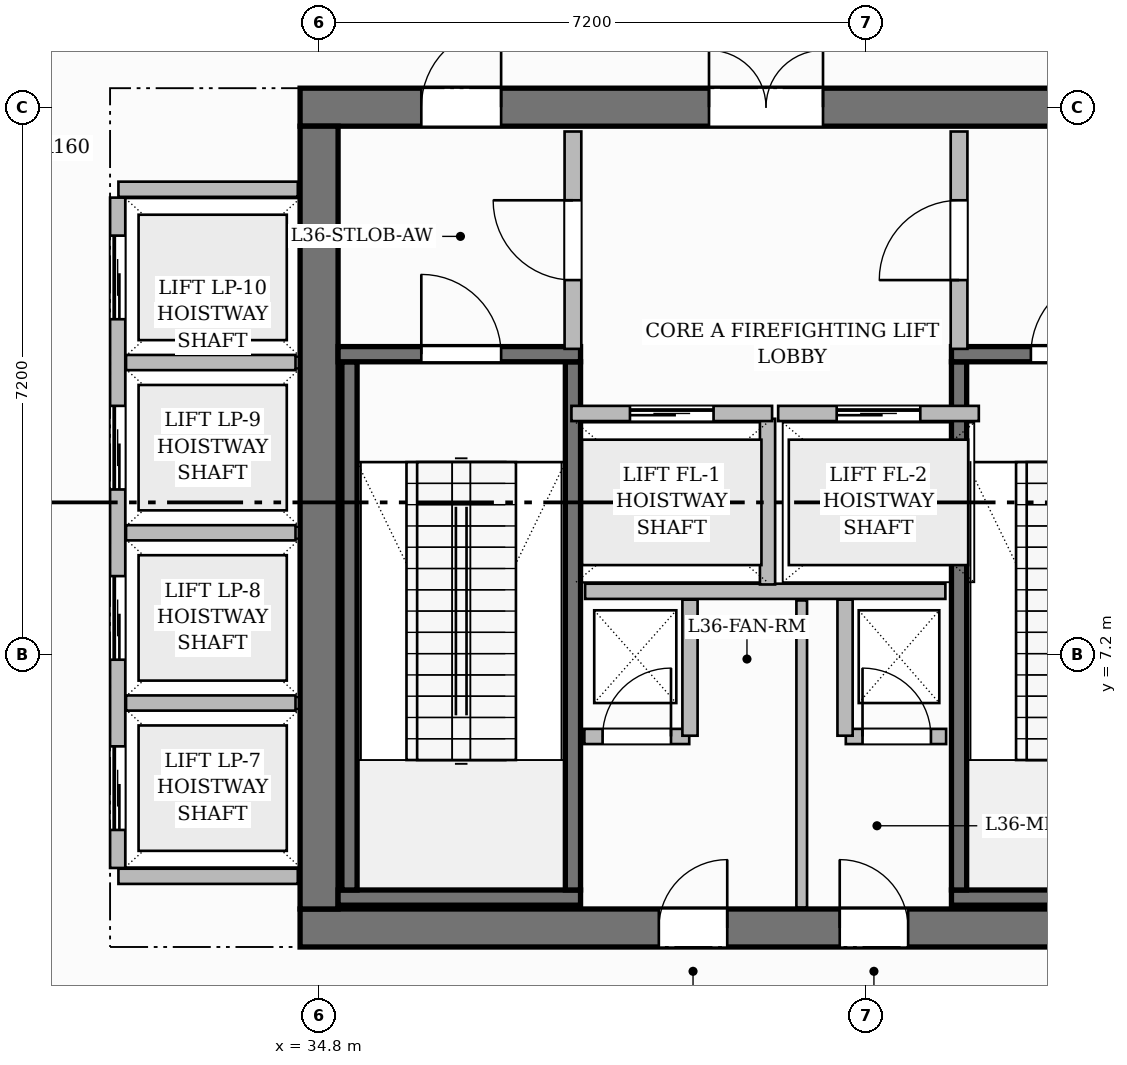
"""IFC4 building model, lengths in metres.
Left out: names, types, materials, properties, quantities, classifications, styles, units other than length and angle.
Written with IfcOpenShell. Run it as: python <this file> out.ifc"""

import sys

from ifc_helpers import new_model, si_unit, direction, frame, frame_2d, origin, place, context, subcontext, project, spatial, rectangle, extrude, source, transform, mapped, element, fill, save


model = new_model("IFC4")
c1 = context("Model", 3, precision=1e-05, world=origin(), true_north=direction((0.0, 1.0)))
c2 = subcontext(c1, "Body", "Model", "MODEL_VIEW")
j1 = project(units=[si_unit("LENGTHUNIT", "METRE"), si_unit("PLANEANGLEUNIT", "RADIAN")], contexts=[c1])
p1 = place(None, origin())
s1 = spatial("IfcSite", under=j1, at=p1, CompositionType="ELEMENT")
p2 = place(p1, origin())
s2 = spatial("IfcBuilding", under=s1, at=p2, CompositionType="ELEMENT")
p3 = place(p2, frame((0.0, 0.0, 145.1)))
s3 = spatial("IfcBuildingStorey", under=s2, at=p3, CompositionType="ELEMENT", Elevation=145.1)
p4 = place(p3, frame((34.55, 3.6, 0.0), z_axis=(0.0, 0.0, 1.0), x_axis=(1.0, 0.0, 0.0)))
e1 = element("IfcWall", 1, at=p4, inside=s3, PredefinedType="SHEAR", context=c2, shape_type="SweptSolid", body=[
    extrude(rectangle(XDim=15.5, YDim=0.5, at=frame_2d((7.75, 0.0))), origin(), (0.0, 0.0, 1.0), 5.2),
])
p5 = place(p4, frame((4.72, 0.0, 0.0)))
e2 = element("IfcOpeningElement", 2, at=p5, cuts=e1, PredefinedType="OPENING", context=c2, shape_type="SweptSolid", body=[
    extrude(rectangle(XDim=0.9, YDim=2.1, at=frame_2d((0.45, 1.05))), frame((0.0, 0.26, 0.0), z_axis=(0.0, -1.0, 0.0), x_axis=(1.0, 0.0, 0.0)), (0.0, 0.0, 1.0), 0.52),
])
p6 = place(p4, frame((7.1, 0.0, 0.0)))
e3 = element("IfcOpeningElement", 3, at=p6, cuts=e1, PredefinedType="OPENING", context=c2, shape_type="SweptSolid", body=[
    extrude(rectangle(XDim=0.9, YDim=2.1, at=frame_2d((0.45, 1.05))), frame((0.0, 0.26, 0.0), z_axis=(0.0, -1.0, 0.0), x_axis=(1.0, 0.0, 0.0)), (0.0, 0.0, 1.0), 0.52),
])
p7 = place(p3, frame((34.55, 14.4, 0.0), z_axis=(0.0, 0.0, 1.0), x_axis=(1.0, 0.0, 0.0)))
e4 = element("IfcWall", 4, at=p7, inside=s3, PredefinedType="SHEAR", context=c2, shape_type="SweptSolid", body=[
    extrude(rectangle(XDim=15.5, YDim=0.5, at=frame_2d((7.75, 0.0))), origin(), (0.0, 0.0, 1.0), 5.2),
])
p8 = place(p7, frame((5.38, 0.0, 0.0)))
e5 = element("IfcOpeningElement", 5, at=p8, cuts=e4, PredefinedType="OPENING", context=c2, shape_type="SweptSolid", body=[
    extrude(rectangle(XDim=1.5, YDim=2.2, at=frame_2d((0.75, 1.1))), frame((0.0, 0.26, 0.0), z_axis=(0.0, -1.0, 0.0), x_axis=(1.0, 0.0, 0.0)), (0.0, 0.0, 1.0), 0.52),
])
p9 = place(p7, frame((1.595, 0.0, 0.0)))
e6 = element("IfcOpeningElement", 6, at=p9, cuts=e4, PredefinedType="OPENING", context=c2, shape_type="SweptSolid", body=[
    extrude(rectangle(XDim=1.05, YDim=2.15, at=frame_2d((0.525, 1.075))), frame((0.0, 0.26, 0.0), z_axis=(0.0, -1.0, 0.0), x_axis=(1.0, 0.0, 0.0)), (0.0, 0.0, 1.0), 0.52),
])
p10 = place(p7, frame((11.225, 0.0, 0.0)))
e7 = element("IfcOpeningElement", 7, at=p10, cuts=e4, PredefinedType="OPENING", context=c2, shape_type="SweptSolid", body=[
    extrude(rectangle(XDim=1.05, YDim=2.15, at=frame_2d((0.525, 1.075))), frame((0.0, 0.26, 0.0), z_axis=(0.0, -1.0, 0.0), x_axis=(1.0, 0.0, 0.0)), (0.0, 0.0, 1.0), 0.52),
])
p11 = place(p3, frame((34.8, 3.85, 0.0), z_axis=(0.0, 0.0, 1.0), x_axis=(0.0, 1.0, 0.0)))
e8 = element("IfcWall", 8, at=p11, inside=s3, PredefinedType="SHEAR", context=c2, shape_type="SweptSolid", body=[
    extrude(rectangle(XDim=10.3, YDim=0.5, at=frame_2d((5.15, 0.0))), origin(), (0.0, 0.0, 1.0), 5.2),
])
p12 = place(p3, frame((35.05, 4.0, 0.0), z_axis=(0.0, 0.0, 1.0), x_axis=(1.0, 0.0, 0.0)))
e9 = element("IfcWall", 9, at=p12, inside=s3, PredefinedType="SHEAR", context=c2, shape_type="SweptSolid", body=[
    extrude(rectangle(XDim=3.19, YDim=0.2, at=frame_2d((1.595, 0.0))), origin(), (0.0, 0.0, 1.0), 5.2),
])
for number, where, z_axis, x_axis in (
    (10, (35.2, 4.1, 0.0), (0.0, 0.0, 1.0), (0.0, 1.0, 0.0)),
    (11, (38.14, 4.1, 0.0), (0.0, 0.0, 1.0), (0.0, 1.0, 0.0)),
):
    element("IfcWall", number, at=place(p3, frame(where, z_axis=z_axis, x_axis=x_axis)), inside=s3, PredefinedType="SHEAR", context=c2, shape_type="SweptSolid", body=[
        extrude(rectangle(XDim=6.95, YDim=0.2, at=frame_2d((3.475, 0.0))), origin(), (0.0, 0.0, 1.0), 5.2),
    ])
p13 = place(p3, frame((35.05, 11.15, 0.0), z_axis=(0.0, 0.0, 1.0), x_axis=(1.0, 0.0, 0.0)))
e12 = element("IfcWall", 12, at=p13, inside=s3, PredefinedType="SHEAR", context=c2, shape_type="SweptSolid", body=[
    extrude(rectangle(XDim=3.19, YDim=0.2, at=frame_2d((1.595, 0.0))), origin(), (0.0, 0.0, 1.0), 5.2),
])
p14 = place(p13, frame((1.095, 0.0, 0.0)))
e13 = element("IfcOpeningElement", 13, at=p14, cuts=e12, PredefinedType="OPENING", context=c2, shape_type="SweptSolid", body=[
    extrude(rectangle(XDim=1.05, YDim=2.2, at=frame_2d((0.525, 1.1))), frame((0.0, 0.11, 0.0), z_axis=(0.0, -1.0, 0.0), x_axis=(1.0, 0.0, 0.0)), (0.0, 0.0, 1.0), 0.22),
])
p15 = place(p3, frame((43.12, 4.0, 0.0), z_axis=(0.0, 0.0, 1.0), x_axis=(1.0, 0.0, 0.0)))
e14 = element("IfcWall", 14, at=p15, inside=s3, PredefinedType="SHEAR", context=c2, shape_type="SweptSolid", body=[
    extrude(rectangle(XDim=6.43, YDim=0.2, at=frame_2d((3.215, 0.0))), origin(), (0.0, 0.0, 1.0), 5.2),
])
p16 = place(p3, frame((43.22, 4.1, 0.0), z_axis=(0.0, 0.0, 1.0), x_axis=(0.0, 1.0, 0.0)))
e15 = element("IfcWall", 15, at=p16, inside=s3, PredefinedType="SHEAR", context=c2, shape_type="SweptSolid", body=[
    extrude(rectangle(XDim=6.95, YDim=0.2, at=frame_2d((3.475, 0.0))), origin(), (0.0, 0.0, 1.0), 5.2),
])
p17 = place(p3, frame((43.12, 11.15, 0.0), z_axis=(0.0, 0.0, 1.0), x_axis=(1.0, 0.0, 0.0)))
e16 = element("IfcWall", 16, at=p17, inside=s3, PredefinedType="SHEAR", context=c2, shape_type="SweptSolid", body=[
    extrude(rectangle(XDim=6.43, YDim=0.2, at=frame_2d((3.215, 0.0))), origin(), (0.0, 0.0, 1.0), 5.2),
])
p18 = place(p17, frame((1.045, 0.0, 0.0)))
e17 = element("IfcOpeningElement", 17, at=p18, cuts=e16, PredefinedType="OPENING", context=c2, shape_type="SweptSolid", body=[
    extrude(rectangle(XDim=1.05, YDim=2.2, at=frame_2d((0.525, 1.1))), frame((0.0, 0.11, 0.0), z_axis=(0.0, -1.0, 0.0), x_axis=(1.0, 0.0, 0.0)), (0.0, 0.0, 1.0), 0.22),
])
p19 = place(p17, frame((4.125, 0.0, 0.0)))
e18 = element("IfcOpeningElement", 18, at=p19, cuts=e16, PredefinedType="OPENING", context=c2, shape_type="SweptSolid", body=[
    extrude(rectangle(XDim=1.05, YDim=2.2, at=frame_2d((0.525, 1.1))), frame((0.0, 0.11, 0.0), z_axis=(0.0, -1.0, 0.0), x_axis=(1.0, 0.0, 0.0)), (0.0, 0.0, 1.0), 0.22),
])
p20 = place(p3, frame((38.3, 8.03, 0.0), z_axis=(0.0, 0.0, 1.0), x_axis=(1.0, 0.0, 0.0)))
e19 = element("IfcWall", 19, at=p20, inside=s3, PredefinedType="PARTITIONING", context=c2, shape_type="SweptSolid", body=[
    extrude(rectangle(XDim=4.74, YDim=0.2, at=frame_2d((2.37, 0.0))), origin(), (0.0, 0.0, 1.0), 4.95),
])
p21 = place(p3, frame((40.7, 8.12, 0.0), z_axis=(0.0, 0.0, 1.0), x_axis=(0.0, 1.0, 0.0)))
e20 = element("IfcWall", 20, at=p21, inside=s3, PredefinedType="PARTITIONING", context=c2, shape_type="SweptSolid", body=[
    extrude(rectangle(XDim=2.18, YDim=0.2, at=frame_2d((1.09, 0.0))), origin(), (0.0, 0.0, 1.0), 4.95),
])
p22 = place(p3, frame((38.14, 11.22, 0.0), z_axis=(0.0, 0.0, 1.0), x_axis=(0.0, 1.0, 0.0)))
e21 = element("IfcWall", 21, at=p22, inside=s3, PredefinedType="PARTITIONING", context=c2, shape_type="SweptSolid", body=[
    extrude(rectangle(XDim=2.86, YDim=0.22, at=frame_2d((1.43, 0.0))), origin(), (0.0, 0.0, 1.0), 4.95),
])
p23 = place(p22, frame((0.905, 0.0, 0.0)))
e22 = element("IfcOpeningElement", 22, at=p23, cuts=e21, PredefinedType="OPENING", context=c2, shape_type="SweptSolid", body=[
    extrude(rectangle(XDim=1.05, YDim=2.15, at=frame_2d((0.525, 1.075))), frame((0.0, 0.12, 0.0), z_axis=(0.0, -1.0, 0.0), x_axis=(1.0, 0.0, 0.0)), (0.0, 0.0, 1.0), 0.24),
])
p24 = place(p3, frame((43.22, 11.22, 0.0), z_axis=(0.0, 0.0, 1.0), x_axis=(0.0, 1.0, 0.0)))
e23 = element("IfcWall", 23, at=p24, inside=s3, PredefinedType="PARTITIONING", context=c2, shape_type="SweptSolid", body=[
    extrude(rectangle(XDim=2.86, YDim=0.22, at=frame_2d((1.43, 0.0))), origin(), (0.0, 0.0, 1.0), 4.95),
])
p25 = place(p24, frame((0.905, 0.0, 0.0)))
e24 = element("IfcOpeningElement", 24, at=p25, cuts=e23, PredefinedType="OPENING", context=c2, shape_type="SweptSolid", body=[
    extrude(rectangle(XDim=1.05, YDim=2.15, at=frame_2d((0.525, 1.075))), frame((0.0, 0.12, 0.0), z_axis=(0.0, -1.0, 0.0), x_axis=(1.0, 0.0, 0.0)), (0.0, 0.0, 1.0), 0.24),
])
p26 = place(p3, frame((38.29, 6.12, 0.0), z_axis=(0.0, 0.0, 1.0), x_axis=(1.0, 0.0, 0.0)))
e25 = element("IfcWall", 25, at=p26, inside=s3, PredefinedType="PARTITIONING", context=c2, shape_type="SweptSolid", body=[
    extrude(rectangle(XDim=1.38, YDim=0.2, at=frame_2d((0.69, 0.0))), origin(), (0.0, 0.0, 1.0), 4.95),
])
p27 = place(p26, frame((0.24, 0.0, 0.0)))
e26 = element("IfcOpeningElement", 26, at=p27, cuts=e25, PredefinedType="OPENING", context=c2, shape_type="SweptSolid", body=[
    extrude(rectangle(XDim=0.9, YDim=2.1, at=frame_2d((0.45, 1.05))), frame((0.0, 0.11, 0.0), z_axis=(0.0, -1.0, 0.0), x_axis=(1.0, 0.0, 0.0)), (0.0, 0.0, 1.0), 0.22),
])
p28 = place(p3, frame((39.68, 6.13, 0.0), z_axis=(0.0, 0.0, 1.0), x_axis=(0.0, 1.0, 0.0)))
e27 = element("IfcWall", 27, at=p28, inside=s3, PredefinedType="PARTITIONING", context=c2, shape_type="SweptSolid", body=[
    extrude(rectangle(XDim=1.79, YDim=0.2, at=frame_2d((0.895, 0.0))), origin(), (0.0, 0.0, 1.0), 4.95),
])
p29 = place(p3, frame((41.73, 6.12, 0.0), z_axis=(0.0, 0.0, 1.0), x_axis=(1.0, 0.0, 0.0)))
e28 = element("IfcWall", 28, at=p29, inside=s3, PredefinedType="PARTITIONING", context=c2, shape_type="SweptSolid", body=[
    extrude(rectangle(XDim=1.32, YDim=0.2, at=frame_2d((0.66, 0.0))), origin(), (0.0, 0.0, 1.0), 4.95),
])
p30 = place(p29, frame((0.22, 0.0, 0.0)))
e29 = element("IfcOpeningElement", 29, at=p30, cuts=e28, PredefinedType="OPENING", context=c2, shape_type="SweptSolid", body=[
    extrude(rectangle(XDim=0.9, YDim=2.1, at=frame_2d((0.45, 1.05))), frame((0.0, 0.11, 0.0), z_axis=(0.0, -1.0, 0.0), x_axis=(1.0, 0.0, 0.0)), (0.0, 0.0, 1.0), 0.22),
])
p31 = place(p3, frame((41.72, 6.13, 0.0), z_axis=(0.0, 0.0, 1.0), x_axis=(0.0, 1.0, 0.0)))
e30 = element("IfcWall", 30, at=p31, inside=s3, PredefinedType="PARTITIONING", context=c2, shape_type="SweptSolid", body=[
    extrude(rectangle(XDim=1.79, YDim=0.2, at=frame_2d((0.895, 0.0))), origin(), (0.0, 0.0, 1.0), 4.95),
])
p32 = place(p3, frame((41.15, 3.87, 0.0), z_axis=(0.0, 0.0, 1.0), x_axis=(0.0, 1.0, 0.0)))
e31 = element("IfcWall", 31, at=p32, inside=s3, PredefinedType="PARTITIONING", context=c2, shape_type="SweptSolid", body=[
    extrude(rectangle(XDim=4.04, YDim=0.14, at=frame_2d((2.02, 0.0))), origin(), (0.0, 0.0, 1.0), 4.95),
])
for number, where, z_axis, x_axis in (
    (32, (32.16, 4.28, 0.0), (0.0, 0.0, 1.0), (1.0, 0.0, 0.0)),
    (33, (32.16, 13.32, 0.0), (0.0, 0.0, 1.0), (1.0, 0.0, 0.0)),
):
    element("IfcWall", number, at=place(p3, frame(where, z_axis=z_axis, x_axis=x_axis)), inside=s3, PredefinedType="PARTITIONING", context=c2, shape_type="SweptSolid", body=[
        extrude(rectangle(XDim=2.36, YDim=0.2, at=frame_2d((1.18, 0.0))), origin(), (0.0, 0.0, 1.0), 4.95),
    ])
p33 = place(p3, frame((32.15, 4.39, 0.0), z_axis=(0.0, 0.0, 1.0), x_axis=(0.0, 1.0, 0.0)))
e34 = element("IfcWall", 34, at=p33, inside=s3, PredefinedType="PARTITIONING", context=c2, shape_type="SweptSolid", body=[
    extrude(rectangle(XDim=8.82, YDim=0.2, at=frame_2d((4.41, 0.0))), origin(), (0.0, 0.0, 1.0), 4.95),
])
p34 = place(p33, frame((0.5, 0.0, 0.0)))
e35 = element("IfcOpeningElement", 35, at=p34, cuts=e34, PredefinedType="OPENING", context=c2, shape_type="SweptSolid", body=[
    extrude(rectangle(XDim=1.1, YDim=2.2, at=frame_2d((0.55, 1.1))), frame((0.0, 0.11, 0.0), z_axis=(0.0, -1.0, 0.0), x_axis=(1.0, 0.0, 0.0)), (0.0, 0.0, 1.0), 0.22),
])
p35 = place(p33, frame((2.74, 0.0, 0.0)))
e36 = element("IfcOpeningElement", 36, at=p35, cuts=e34, PredefinedType="OPENING", context=c2, shape_type="SweptSolid", body=[
    extrude(rectangle(XDim=1.1, YDim=2.2, at=frame_2d((0.55, 1.1))), frame((0.0, 0.11, 0.0), z_axis=(0.0, -1.0, 0.0), x_axis=(1.0, 0.0, 0.0)), (0.0, 0.0, 1.0), 0.22),
])
p36 = place(p33, frame((4.98, 0.0, 0.0)))
e37 = element("IfcOpeningElement", 37, at=p36, cuts=e34, PredefinedType="OPENING", context=c2, shape_type="SweptSolid", body=[
    extrude(rectangle(XDim=1.1, YDim=2.2, at=frame_2d((0.55, 1.1))), frame((0.0, 0.11, 0.0), z_axis=(0.0, -1.0, 0.0), x_axis=(1.0, 0.0, 0.0)), (0.0, 0.0, 1.0), 0.22),
])
p37 = place(p33, frame((7.22, 0.0, 0.0)))
e38 = element("IfcOpeningElement", 38, at=p37, cuts=e34, PredefinedType="OPENING", context=c2, shape_type="SweptSolid", body=[
    extrude(rectangle(XDim=1.1, YDim=2.2, at=frame_2d((0.55, 1.1))), frame((0.0, 0.11, 0.0), z_axis=(0.0, -1.0, 0.0), x_axis=(1.0, 0.0, 0.0)), (0.0, 0.0, 1.0), 0.22),
])
for number, where, z_axis, x_axis in (
    (39, (32.26, 6.56, 0.0), (0.0, 0.0, 1.0), (1.0, 0.0, 0.0)),
    (40, (32.26, 8.8, 0.0), (0.0, 0.0, 1.0), (1.0, 0.0, 0.0)),
    (41, (32.26, 11.04, 0.0), (0.0, 0.0, 1.0), (1.0, 0.0, 0.0)),
):
    element("IfcWall", number, at=place(p3, frame(where, z_axis=z_axis, x_axis=x_axis)), inside=s3, PredefinedType="PARTITIONING", context=c2, shape_type="SweptSolid", body=[
        extrude(rectangle(XDim=2.23, YDim=0.2, at=frame_2d((1.115, 0.0))), origin(), (0.0, 0.0, 1.0), 4.95),
    ])
p38 = place(p3, frame((38.12, 10.37, 0.0), z_axis=(0.0, 0.0, 1.0), x_axis=(1.0, 0.0, 0.0)))
e42 = element("IfcWall", 42, at=p38, inside=s3, PredefinedType="PARTITIONING", context=c2, shape_type="SweptSolid", body=[
    extrude(rectangle(XDim=2.64, YDim=0.2, at=frame_2d((1.32, 0.0))), origin(), (0.0, 0.0, 1.0), 4.95),
])
p39 = place(p38, frame((0.77, 0.0, 0.0)))
e43 = element("IfcOpeningElement", 43, at=p39, cuts=e42, PredefinedType="OPENING", context=c2, shape_type="SweptSolid", body=[
    extrude(rectangle(XDim=1.1, YDim=2.2, at=frame_2d((0.55, 1.1))), frame((0.0, 0.11, 0.0), z_axis=(0.0, -1.0, 0.0), x_axis=(1.0, 0.0, 0.0)), (0.0, 0.0, 1.0), 0.22),
])
p40 = place(p3, frame((40.84, 10.37, 0.0), z_axis=(0.0, 0.0, 1.0), x_axis=(1.0, 0.0, 0.0)))
e44 = element("IfcWall", 44, at=p40, inside=s3, PredefinedType="PARTITIONING", context=c2, shape_type="SweptSolid", body=[
    extrude(rectangle(XDim=2.64, YDim=0.2, at=frame_2d((1.32, 0.0))), origin(), (0.0, 0.0, 1.0), 4.95),
])
p41 = place(p40, frame((0.77, 0.0, 0.0)))
e45 = element("IfcOpeningElement", 45, at=p41, cuts=e44, PredefinedType="OPENING", context=c2, shape_type="SweptSolid", body=[
    extrude(rectangle(XDim=1.1, YDim=2.2, at=frame_2d((0.55, 1.1))), frame((0.0, 0.11, 0.0), z_axis=(0.0, -1.0, 0.0), x_axis=(1.0, 0.0, 0.0)), (0.0, 0.0, 1.0), 0.22),
])
m1 = source(origin(), c2, "Body", "SweptSolid", [
    extrude(rectangle(XDim=1.05, YDim=2.2, at=frame_2d((0.525, 1.1))), frame((0.0, 0.025, 0.0), z_axis=(0.0, -1.0, 0.0), x_axis=(1.0, 0.0, 0.0)), (0.0, 0.0, 1.0), 0.05),
])
p42 = place(p14, origin())
e46 = element("IfcDoor", 46, at=p42, inside=s3, OperationType="SINGLE_SWING_LEFT", PredefinedType="DOOR", context=c2, shape_type="MappedRepresentation", body=[
    mapped(m1, transform((0.0, 0.0, 0.0), scale=1.0)),
])
fill(e13, e46)
p43 = place(p18, origin())
e47 = element("IfcDoor", 47, at=p43, inside=s3, OperationType="SINGLE_SWING_RIGHT", PredefinedType="DOOR", context=c2, shape_type="MappedRepresentation", body=[
    mapped(m1, transform((0.0, 0.0, 0.0), scale=1.0)),
])
fill(e17, e47)
m2 = source(origin(), c2, "Body", "SweptSolid", [
    extrude(rectangle(XDim=1.05, YDim=2.15, at=frame_2d((0.525, 1.075))), frame((0.0, 0.025, 0.0), z_axis=(0.0, -1.0, 0.0), x_axis=(1.0, 0.0, 0.0)), (0.0, 0.0, 1.0), 0.05),
])
p44 = place(p23, origin())
e48 = element("IfcDoor", 48, at=p44, inside=s3, OperationType="SINGLE_SWING_RIGHT", PredefinedType="DOOR", context=c2, shape_type="MappedRepresentation", body=[
    mapped(m2, transform((0.0, 0.0, 0.0), scale=1.0)),
])
fill(e22, e48)
p45 = place(p25, origin())
e49 = element("IfcDoor", 49, at=p45, inside=s3, OperationType="SINGLE_SWING_LEFT", PredefinedType="DOOR", context=c2, shape_type="MappedRepresentation", body=[
    mapped(m2, transform((0.0, 0.0, 0.0), scale=1.0)),
])
fill(e24, e49)
m3 = source(origin(), c2, "Body", "SweptSolid", [
    extrude(rectangle(XDim=1.5, YDim=2.2, at=frame_2d((0.75, 1.1))), frame((0.0, 0.025, 0.0), z_axis=(0.0, -1.0, 0.0), x_axis=(1.0, 0.0, 0.0)), (0.0, 0.0, 1.0), 0.05),
])
p46 = place(p8, origin())
e50 = element("IfcDoor", 50, at=p46, inside=s3, OperationType="DOUBLE_DOOR_SINGLE_SWING", PredefinedType="DOOR", context=c2, shape_type="MappedRepresentation", body=[
    mapped(m3, transform((0.0, 0.0, 0.0), scale=1.0)),
])
fill(e5, e50)
p47 = place(p9, origin())
e51 = element("IfcDoor", 51, at=p47, inside=s3, OperationType="SINGLE_SWING_RIGHT", PredefinedType="DOOR", context=c2, shape_type="MappedRepresentation", body=[
    mapped(m2, transform((0.0, 0.0, 0.0), scale=1.0)),
])
fill(e6, e51)
m4 = source(origin(), c2, "Body", "SweptSolid", [
    extrude(rectangle(XDim=0.9, YDim=2.1, at=frame_2d((0.45, 1.05))), frame((0.0, 0.025, 0.0), z_axis=(0.0, -1.0, 0.0), x_axis=(1.0, 0.0, 0.0)), (0.0, 0.0, 1.0), 0.05),
])
p48 = place(p27, origin())
e52 = element("IfcDoor", 52, at=p48, inside=s3, OperationType="SINGLE_SWING_RIGHT", PredefinedType="DOOR", context=c2, shape_type="MappedRepresentation", body=[
    mapped(m4, transform((0.0, 0.0, 0.0), scale=1.0)),
])
fill(e26, e52)
p49 = place(p30, origin())
e53 = element("IfcDoor", 53, at=p49, inside=s3, OperationType="SINGLE_SWING_LEFT", PredefinedType="DOOR", context=c2, shape_type="MappedRepresentation", body=[
    mapped(m4, transform((0.0, 0.0, 0.0), scale=1.0)),
])
fill(e29, e53)
p50 = place(p5, origin())
e54 = element("IfcDoor", 54, at=p50, inside=s3, OperationType="SINGLE_SWING_RIGHT", PredefinedType="DOOR", context=c2, shape_type="MappedRepresentation", body=[
    mapped(m4, transform((0.0, 0.0, 0.0), scale=1.0)),
])
fill(e2, e54)
p51 = place(p6, origin())
e55 = element("IfcDoor", 55, at=p51, inside=s3, OperationType="SINGLE_SWING_LEFT", PredefinedType="DOOR", context=c2, shape_type="MappedRepresentation", body=[
    mapped(m4, transform((0.0, 0.0, 0.0), scale=1.0)),
])
fill(e3, e55)
m5 = source(origin(), c2, "Body", "SweptSolid", [
    extrude(rectangle(XDim=1.1, YDim=2.2, at=frame_2d((0.55, 1.1))), frame((0.0, 0.025, 0.0), z_axis=(0.0, -1.0, 0.0), x_axis=(1.0, 0.0, 0.0)), (0.0, 0.0, 1.0), 0.05),
])
p52 = place(p39, origin())
e56 = element("IfcDoor", 56, at=p52, inside=s3, OperationType="SLIDING_TO_LEFT", PredefinedType="DOOR", context=c2, shape_type="MappedRepresentation", body=[
    mapped(m5, transform((0.0, 0.0, 0.0), scale=1.0)),
])
fill(e43, e56)
p53 = place(p41, origin())
e57 = element("IfcDoor", 57, at=p53, inside=s3, OperationType="SLIDING_TO_LEFT", PredefinedType="DOOR", context=c2, shape_type="MappedRepresentation", body=[
    mapped(m5, transform((0.0, 0.0, 0.0), scale=1.0)),
])
fill(e45, e57)
p54 = place(p34, origin())
e58 = element("IfcDoor", 58, at=p54, inside=s3, OperationType="SLIDING_TO_LEFT", PredefinedType="DOOR", context=c2, shape_type="MappedRepresentation", body=[
    mapped(m5, transform((0.0, 0.0, 0.0), scale=1.0)),
])
fill(e35, e58)
p55 = place(p35, origin())
e59 = element("IfcDoor", 59, at=p55, inside=s3, OperationType="SLIDING_TO_LEFT", PredefinedType="DOOR", context=c2, shape_type="MappedRepresentation", body=[
    mapped(m5, transform((0.0, 0.0, 0.0), scale=1.0)),
])
fill(e36, e59)
p56 = place(p36, origin())
e60 = element("IfcDoor", 60, at=p56, inside=s3, OperationType="SLIDING_TO_LEFT", PredefinedType="DOOR", context=c2, shape_type="MappedRepresentation", body=[
    mapped(m5, transform((0.0, 0.0, 0.0), scale=1.0)),
])
fill(e37, e60)
p57 = place(p37, origin())
e61 = element("IfcDoor", 61, at=p57, inside=s3, OperationType="SLIDING_TO_LEFT", PredefinedType="DOOR", context=c2, shape_type="MappedRepresentation", body=[
    mapped(m5, transform((0.0, 0.0, 0.0), scale=1.0)),
])
fill(e38, e61)
save(model, sys.argv[1])
